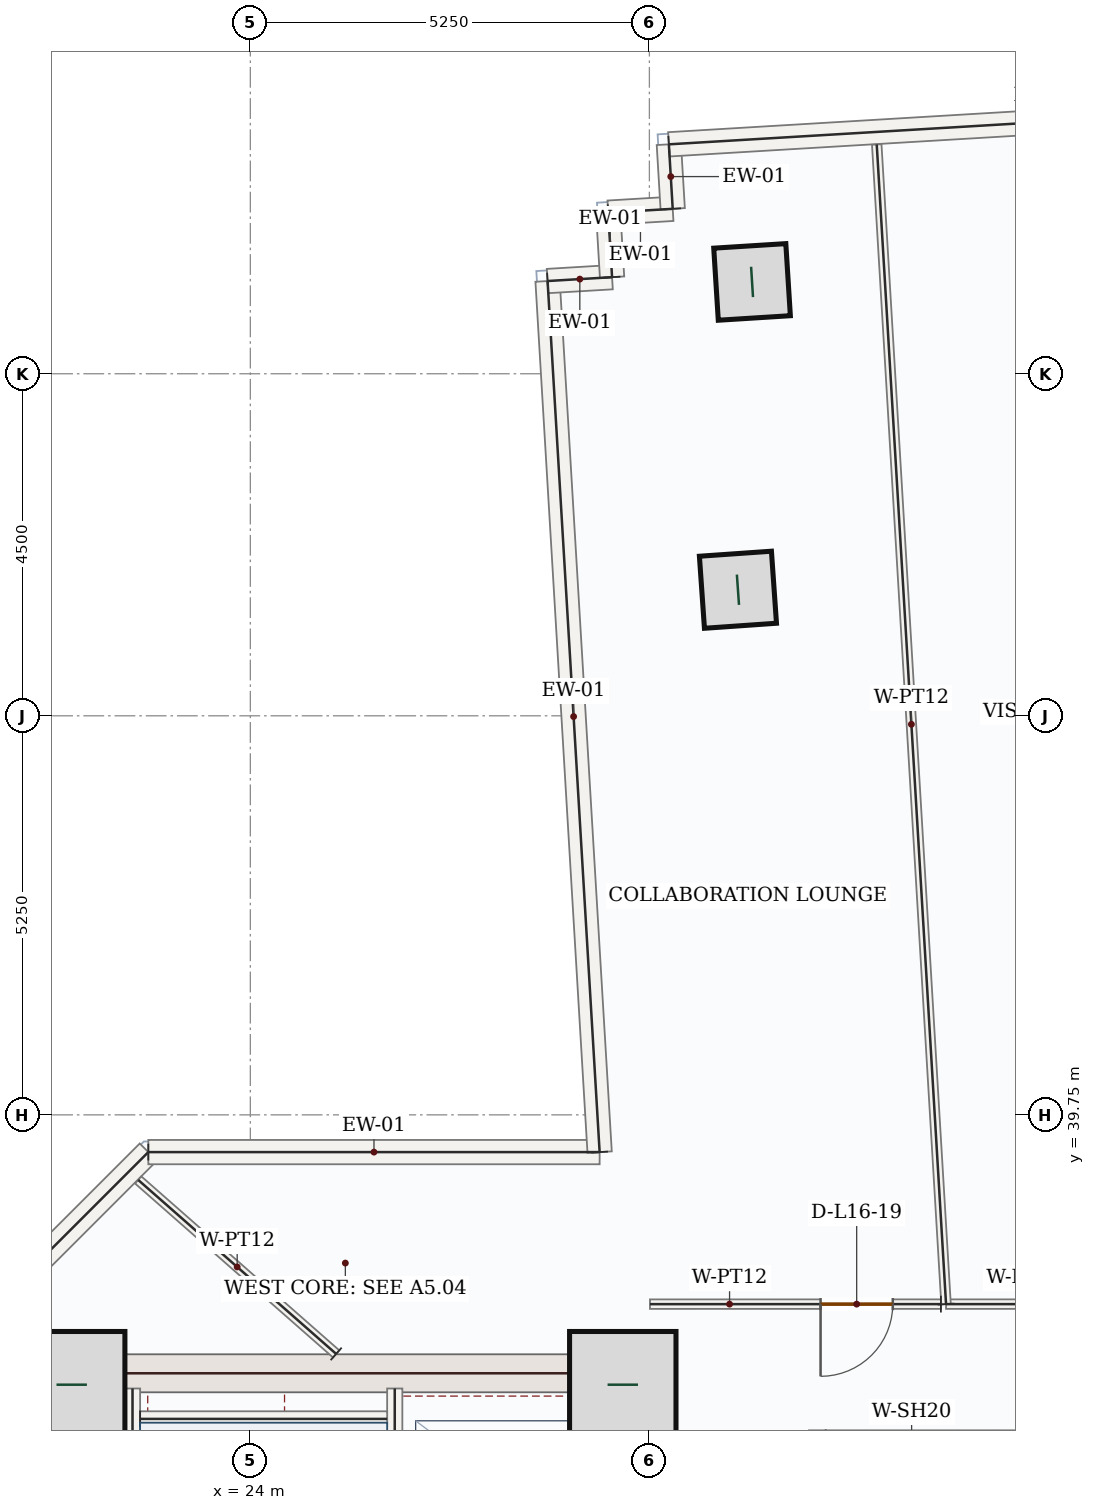
"""IFC4 building model, lengths in metres.
Left out: names, types, materials, properties, quantities, classifications, styles, units other than length and angle.
Written with IfcOpenShell. Run it as: python <this file> out.ifc"""

import sys

from ifc_helpers import new_model, si_unit, direction, frame, frame_2d, origin, origin_2d, place, context, subcontext, project, spatial, rectangle, hollow_rectangle, extrude, source, transform, mapped, element, fill, save


model = new_model("IFC4")
c1 = context("Model", 3, precision=1e-05, world=origin(), true_north=direction((0.0, 1.0)))
c2 = subcontext(c1, "Body", "Model", "MODEL_VIEW")
j1 = project(units=[si_unit("LENGTHUNIT", "METRE"), si_unit("PLANEANGLEUNIT", "RADIAN")], contexts=[c1])
p1 = place(None, origin())
s1 = spatial("IfcSite", under=j1, at=p1, CompositionType="ELEMENT")
p2 = place(p1, origin())
s2 = spatial("IfcBuilding", under=s1, at=p2, CompositionType="ELEMENT")
p3 = place(p2, frame((0.0, 0.0, 75.3)))
s3 = spatial("IfcBuildingStorey", under=s2, at=p3, CompositionType="ELEMENT", Elevation=75.3)
m1 = source(origin(), c2, "Body", "SweptSolid", [
    extrude(rectangle(XDim=8.55, YDim=0.5, at=frame_2d((4.275, 0.0))), origin(), (0.0, 0.0, 1.0), 3.95),
])
p4 = place(p3, frame((21.5, 28.05, 0.0), z_axis=(0.0, 0.0, 1.0), x_axis=(0.0, 1.0, 0.0)))
e1 = element("IfcWall", 1, at=p4, inside=s3, PredefinedType="SHEAR", context=c2, shape_type="MappedRepresentation", body=[
    mapped(m1, transform((0.0, 0.0, 0.0), x_axis=(1.0, 0.0, 0.0), y_axis=(0.0, 1.0, 0.0), z_axis=(0.0, 0.0, 1.0), scale=1.0)),
])
p5 = place(p3, frame((29.0, 28.05, 0.0), z_axis=(0.0, 0.0, 1.0), x_axis=(0.0, 1.0, 0.0)))
e2 = element("IfcWall", 2, at=p5, inside=s3, PredefinedType="SHEAR", context=c2, shape_type="SweptSolid", body=[
    extrude(rectangle(XDim=8.55, YDim=0.5, at=frame_2d((4.275, 0.0))), origin(), (0.0, 0.0, 1.0), 3.95),
])
p6 = place(p5, frame((1.5, 0.0, 0.0)))
e3 = element("IfcOpeningElement", 3, at=p6, cuts=e2, PredefinedType="OPENING", context=c2, shape_type="SweptSolid", body=[
    extrude(rectangle(XDim=1.1, YDim=2.2, at=frame_2d((0.55, 1.1))), frame((0.0, 0.26, 0.0), z_axis=(0.0, -1.0, 0.0), x_axis=(1.0, 0.0, 0.0)), (0.0, 0.0, 1.0), 0.52),
])
m2 = source(origin(), c2, "Body", "SweptSolid", [
    extrude(rectangle(XDim=7.0, YDim=0.5, at=frame_2d((3.5, 0.0))), origin(), (0.0, 0.0, 1.0), 3.95),
])
p7 = place(p3, frame((21.75, 36.35, 0.0), z_axis=(0.0, 0.0, 1.0), x_axis=(1.0, 0.0, 0.0)))
e4 = element("IfcWall", 4, at=p7, inside=s3, PredefinedType="SHEAR", context=c2, shape_type="MappedRepresentation", body=[
    mapped(m2, transform((0.0, 0.0, 0.0), x_axis=(1.0, 0.0, 0.0), y_axis=(0.0, 1.0, 0.0), z_axis=(0.0, 0.0, 1.0), scale=1.0)),
])
m3 = source(origin(), c2, "Body", "SweptSolid", [
    extrude(rectangle(XDim=1.4, YDim=1.4, at=origin_2d()), origin(), (0.0, 0.0, 1.0), 4.2),
])
for number, where, z_axis, x_axis in (
    (5, (21.65, 36.2, 0.0), (0.0, 0.0, 1.0), (1.0, 0.0, 0.0)),
    (6, (28.9, 36.2, 0.0), (0.0, 0.0, 1.0), (1.0, 0.0, 0.0)),
):
    element("IfcColumn", number, at=place(p3, frame(where, z_axis=z_axis, x_axis=x_axis)), inside=s3, PredefinedType="COLUMN", context=c2, shape_type="MappedRepresentation", body=[
        mapped(m3, transform((0.0, 0.0, 0.0), x_axis=(1.0, 0.0, 0.0), y_axis=(0.0, 1.0, 0.0), z_axis=(0.0, 0.0, 1.0), scale=1.0)),
    ])
m4 = source(origin(), c2, "Body", "SweptSolid", [
    extrude(hollow_rectangle(XDim=0.95, YDim=0.95, WallThickness=0.05, at=origin_2d()), origin(), (0.0, 0.0, 1.0), 4.2),
])
for number, where, z_axis, x_axis in (
    (7, (30.415, 46.658, 0.0), (0.0, 0.0, 1.0), (-0.07, 0.998, 0.0)),
    (8, (30.601, 50.708, 0.0), (0.0, 0.0, 1.0), (-0.063, 0.998, 0.0)),
):
    element("IfcColumn", number, at=place(p3, frame(where, z_axis=z_axis, x_axis=x_axis)), inside=s3, PredefinedType="COLUMN", context=c2, shape_type="MappedRepresentation", body=[
        mapped(m4, transform((0.0, 0.0, 0.0), x_axis=(1.0, 0.0, 0.0), y_axis=(0.0, 1.0, 0.0), z_axis=(0.0, 0.0, 1.0), scale=1.0)),
    ])
m5 = source(origin(), c2, "Body", "SweptSolid", [
    extrude(rectangle(XDim=5.258, YDim=0.32, at=frame_2d((2.629, 0.0))), origin(), (0.0, 0.0, 1.0), 3.95),
])
p8 = place(p3, frame((18.94, 35.542, 0.0), z_axis=(0.0, 0.0, 1.0), x_axis=(0.707106781187, 0.707106781187, 0.0)))
e9 = element("IfcWall", 9, at=p8, inside=s3, PredefinedType="SOLIDWALL", context=c2, shape_type="MappedRepresentation", body=[
    mapped(m5, transform((0.0, 0.0, 0.0), x_axis=(1.0, 0.0, 0.0), y_axis=(0.0, 1.0, 0.0), z_axis=(0.0, 0.0, 1.0), scale=1.0)),
])
m6 = source(origin(), c2, "Body", "SweptSolid", [
    extrude(rectangle(XDim=5.938, YDim=0.32, at=frame_2d((2.969, 0.0))), origin(), (0.0, 0.0, 1.0), 3.95),
])
p9 = place(p3, frame((22.658, 39.26, 0.0), z_axis=(0.0, 0.0, 1.0), x_axis=(1.0, 0.0, 0.0)))
e10 = element("IfcWall", 10, at=p9, inside=s3, PredefinedType="SOLIDWALL", context=c2, shape_type="MappedRepresentation", body=[
    mapped(m6, transform((0.0, 0.0, 0.0), x_axis=(1.0, 0.0, 0.0), y_axis=(0.0, 1.0, 0.0), z_axis=(0.0, 0.0, 1.0), scale=1.0)),
])
m7 = source(origin(), c2, "Body", "SweptSolid", [
    extrude(rectangle(XDim=11.48, YDim=0.32, at=frame_2d((5.74, 0.0))), origin(), (0.0, 0.0, 1.0), 3.95),
])
p10 = place(p3, frame((28.595, 39.26, 0.0), z_axis=(0.0, 0.0, 1.0), x_axis=(-0.059651994121, 0.998219234235, 0.0)))
e11 = element("IfcWall", 11, at=p10, inside=s3, PredefinedType="SOLIDWALL", context=c2, shape_type="MappedRepresentation", body=[
    mapped(m7, transform((0.0, 0.0, 0.0), x_axis=(1.0, 0.0, 0.0), y_axis=(0.0, 1.0, 0.0), z_axis=(0.0, 0.0, 1.0), scale=1.0)),
])
m8 = source(origin(), c2, "Body", "SweptSolid", [
    extrude(rectangle(XDim=0.85, YDim=0.32, at=frame_2d((0.425, 0.0))), origin(), (0.0, 0.0, 1.0), 3.95),
])
for number, where, z_axis, x_axis in (
    (12, (27.911, 50.72, 0.0), (0.0, 0.0, 1.0), (0.998, 0.06, 0.0)),
    (13, (28.759, 50.771, 0.0), (0.0, 0.0, 1.0), (-0.059, 0.998, 0.0)),
    (14, (28.708, 51.619, 0.0), (0.0, 0.0, 1.0), (0.998, 0.06, 0.0)),
    (15, (29.557, 51.67, 0.0), (0.0, 0.0, 1.0), (-0.06, 0.998, 0.0)),
):
    element("IfcWall", number, at=place(p3, frame(where, z_axis=z_axis, x_axis=x_axis)), inside=s3, PredefinedType="SOLIDWALL", context=c2, shape_type="MappedRepresentation", body=[
        mapped(m8, transform((0.0, 0.0, 0.0), x_axis=(1.0, 0.0, 0.0), y_axis=(0.0, 1.0, 0.0), z_axis=(0.0, 0.0, 1.0), scale=1.0)),
    ])
m9 = source(origin(), c2, "Body", "SweptSolid", [
    extrude(rectangle(XDim=9.92, YDim=0.32, at=frame_2d((4.96, 0.0))), origin(), (0.0, 0.0, 1.0), 3.95),
])
p11 = place(p3, frame((29.506, 52.518, 0.0), z_axis=(0.0, 0.0, 1.0), x_axis=(0.998218942745, 0.059656871726, 0.0)))
e16 = element("IfcWall", 16, at=p11, inside=s3, PredefinedType="SOLIDWALL", context=c2, shape_type="MappedRepresentation", body=[
    mapped(m9, transform((0.0, 0.0, 0.0), x_axis=(1.0, 0.0, 0.0), y_axis=(0.0, 1.0, 0.0), z_axis=(0.0, 0.0, 1.0), scale=1.0)),
])
m10 = source(origin(), c2, "Body", "SweptSolid", [
    extrude(rectangle(XDim=7.87, YDim=0.2, at=frame_2d((3.935, 0.0))), origin(), (0.0, 0.0, 1.0), 3.95),
])
p12 = place(p3, frame((22.45, 28.28, 0.0), z_axis=(0.0, 0.0, 1.0), x_axis=(0.0, 1.0, 0.0)))
e17 = element("IfcWall", 17, at=p12, inside=s3, PredefinedType="SOLIDWALL", context=c2, shape_type="MappedRepresentation", body=[
    mapped(m10, transform((0.0, 0.0, 0.0), x_axis=(1.0, 0.0, 0.0), y_axis=(0.0, 1.0, 0.0), z_axis=(0.0, 0.0, 1.0), scale=1.0)),
])
p13 = place(p3, frame((25.9, 28.15, 0.0), z_axis=(0.0, 0.0, 1.0), x_axis=(0.0, 1.0, 0.0)))
e18 = element("IfcWall", 18, at=p13, inside=s3, PredefinedType="SOLIDWALL", context=c2, shape_type="SweptSolid", body=[
    extrude(rectangle(XDim=8.0, YDim=0.2, at=frame_2d((4.0, 0.0))), origin(), (0.0, 0.0, 1.0), 3.95),
])
p14 = place(p13, frame((0.4, 0.0, 0.0)))
e19 = element("IfcOpeningElement", 19, at=p14, cuts=e18, PredefinedType="OPENING", context=c2, shape_type="SweptSolid", body=[
    extrude(rectangle(XDim=1.05, YDim=2.15, at=frame_2d((0.525, 1.075))), frame((0.0, 0.11, 0.0), z_axis=(0.0, -1.0, 0.0), x_axis=(1.0, 0.0, 0.0)), (0.0, 0.0, 1.0), 0.22),
])
m11 = source(origin(), c2, "Body", "SweptSolid", [
    extrude(rectangle(XDim=3.25, YDim=0.2, at=frame_2d((1.625, 0.0))), origin(), (0.0, 0.0, 1.0), 3.95),
])
p15 = place(p3, frame((22.55, 35.75, 0.0), z_axis=(0.0, 0.0, 1.0), x_axis=(1.0, 0.0, 0.0)))
e20 = element("IfcWall", 20, at=p15, inside=s3, PredefinedType="SOLIDWALL", context=c2, shape_type="MappedRepresentation", body=[
    mapped(m11, transform((0.0, 0.0, 0.0), x_axis=(1.0, 0.0, 0.0), y_axis=(0.0, 1.0, 0.0), z_axis=(0.0, 0.0, 1.0), scale=1.0)),
])
m12 = source(origin(), c2, "Body", "SweptSolid", [
    extrude(rectangle(XDim=2.4, YDim=0.2, at=frame_2d((1.2, 0.0))), origin(), (0.0, 0.0, 1.0), 3.95),
])
for number, where, z_axis, x_axis in (
    (21, (31.45, 33.2, 0.0), (0.0, 0.0, 1.0), (0.0, 1.0, 0.0)),
    (22, (33.95, 33.2, 0.0), (0.0, 0.0, 1.0), (0.0, 1.0, 0.0)),
):
    element("IfcWall", number, at=place(p3, frame(where, z_axis=z_axis, x_axis=x_axis)), inside=s3, PredefinedType="SOLIDWALL", context=c2, shape_type="MappedRepresentation", body=[
        mapped(m12, transform((0.0, 0.0, 0.0), x_axis=(1.0, 0.0, 0.0), y_axis=(0.0, 1.0, 0.0), z_axis=(0.0, 0.0, 1.0), scale=1.0)),
    ])
p16 = place(p3, frame((36.932, 37.26, 0.0), z_axis=(0.0, 0.0, 1.0), x_axis=(-1.0, 0.0, 0.0)))
e23 = element("IfcWall", 23, at=p16, inside=s3, PredefinedType="PARTITIONING", context=c2, shape_type="SweptSolid", body=[
    extrude(rectangle(XDim=3.779, YDim=0.125, at=frame_2d((1.89, 0.0))), origin(), (0.0, 0.0, 1.0), 3.95),
])
p17 = place(p16, frame((0.622, 0.0, 0.0)))
e24 = element("IfcOpeningElement", 24, at=p17, cuts=e23, PredefinedType="OPENING", context=c2, shape_type="SweptSolid", body=[
    extrude(rectangle(XDim=0.95, YDim=2.15, at=frame_2d((0.475, 1.075))), frame((0.0, 0.073, 0.0), z_axis=(0.0, -1.0, 0.0), x_axis=(1.0, 0.0, 0.0)), (0.0, 0.0, 1.0), 0.145),
])
m13 = source(origin(), c2, "Body", "SweptSolid", [
    extrude(rectangle(XDim=15.283, YDim=0.125, at=frame_2d((7.642, 0.0))), origin(), (0.0, 0.0, 1.0), 3.95),
])
p18 = place(p3, frame((33.153, 37.26, 0.0), z_axis=(0.0, 0.0, 1.0), x_axis=(-0.059648121824, 0.99821946563, 0.0)))
e25 = element("IfcWall", 25, at=p18, inside=s3, PredefinedType="PARTITIONING", context=c2, shape_type="MappedRepresentation", body=[
    mapped(m13, transform((0.0, 0.0, 0.0), x_axis=(1.0, 0.0, 0.0), y_axis=(0.0, 1.0, 0.0), z_axis=(0.0, 0.0, 1.0), scale=1.0)),
])
p19 = place(p3, frame((33.085, 37.26, 0.0), z_axis=(0.0, 0.0, 1.0), x_axis=(-0.999999997966, -6.3783646e-05, 0.0)))
e26 = element("IfcWall", 26, at=p19, inside=s3, PredefinedType="PARTITIONING", context=c2, shape_type="SweptSolid", body=[
    extrude(rectangle(XDim=3.828, YDim=0.125, at=frame_2d((1.914, 0.0))), origin(), (0.0, 0.0, 1.0), 3.95),
])
p20 = place(p19, frame((0.633, 0.0, 0.0)))
e27 = element("IfcOpeningElement", 27, at=p20, cuts=e26, PredefinedType="OPENING", context=c2, shape_type="SweptSolid", body=[
    extrude(rectangle(XDim=0.95, YDim=2.15, at=frame_2d((0.475, 1.075))), frame((0.0, 0.073, 0.0), z_axis=(0.0, -1.0, 0.0), x_axis=(1.0, 0.0, 0.0)), (0.0, 0.0, 1.0), 0.145),
])
m14 = source(origin(), c2, "Body", "SweptSolid", [
    extrude(rectangle(XDim=3.467, YDim=0.125, at=frame_2d((1.733, 0.0))), origin(), (0.0, 0.0, 1.0), 3.95),
])
p21 = place(p3, frame((25.129, 36.605, 0.0), z_axis=(0.0, 0.0, 1.0), x_axis=(-0.751135268809, 0.66014832269, 0.0)))
e28 = element("IfcWall", 28, at=p21, inside=s3, PredefinedType="PARTITIONING", context=c2, shape_type="MappedRepresentation", body=[
    mapped(m14, transform((0.0, 0.0, 0.0), x_axis=(1.0, 0.0, 0.0), y_axis=(0.0, 1.0, 0.0), z_axis=(0.0, 0.0, 1.0), scale=1.0)),
])
m15 = source(origin(), c2, "Body", "SweptSolid", [
    extrude(rectangle(XDim=0.95, YDim=2.15, at=frame_2d((0.475, 1.075))), frame((0.0, 0.025, 0.0), z_axis=(0.0, -1.0, 0.0), x_axis=(1.0, 0.0, 0.0)), (0.0, 0.0, 1.0), 0.05),
])
p22 = place(p20, origin())
e29 = element("IfcDoor", 29, at=p22, inside=s3, OperationType="SINGLE_SWING_RIGHT", PredefinedType="DOOR", context=c2, shape_type="MappedRepresentation", body=[
    mapped(m15, transform((0.0, 0.0, 0.0), x_axis=(1.0, 0.0, 0.0), y_axis=(0.0, 1.0, 0.0), z_axis=(0.0, 0.0, 1.0), scale=1.0)),
])
fill(e27, e29)
save(model, sys.argv[1])
